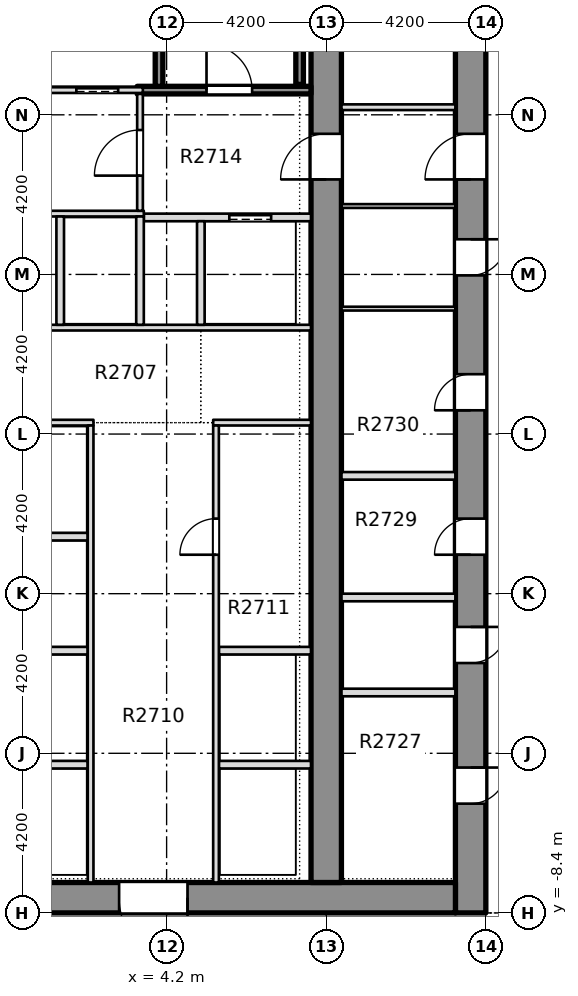
"""IFC4 building model, lengths in metres.
Left out: names, types, materials, properties, quantities, classifications, styles, units other than length and angle.
Written with IfcOpenShell. Run it as: python <this file> out.ifc"""

import sys

from ifc_helpers import new_model, si_unit, direction, frame, frame_2d, origin, place, context, subcontext, project, spatial, rectangle, extrude, element, fill, save


model = new_model("IFC4")
c1 = context("Model", 3, precision=1e-05, world=origin(), true_north=direction((0.0, 1.0)))
c2 = subcontext(c1, "Body", "Model", "MODEL_VIEW")
j1 = project(units=[si_unit("LENGTHUNIT", "METRE"), si_unit("PLANEANGLEUNIT", "RADIAN")], contexts=[c1])
p1 = place(None, origin())
s1 = spatial("IfcSite", under=j1, at=p1, CompositionType="ELEMENT")
p2 = place(p1, origin())
s2 = spatial("IfcBuilding", under=s1, at=p2, CompositionType="ELEMENT")
p3 = place(p2, frame((0.0, 0.0, 108.0)))
s3 = spatial("IfcBuildingStorey", under=s2, at=p3, CompositionType="ELEMENT", Elevation=108.0)
p4 = place(p3, frame((12.2, -8.4, -0.32), z_axis=(0.0, 0.0, 1.0), x_axis=(0.0, 1.0, 0.0)))
e1 = element("IfcWall", 1, at=p4, inside=s3, PredefinedType="SHEAR", context=c2, shape_type="SweptSolid", body=[
    extrude(rectangle(XDim=30.15, YDim=0.8, at=frame_2d((15.075, 0.0))), origin(), (0.0, 0.0, 1.0), 3.45),
])
p5 = place(p4, frame((2.875, 0.0, 0.32)))
e2 = element("IfcOpeningElement", 2, at=p5, cuts=e1, PredefinedType="OPENING", context=c2, shape_type="SweptSolid", body=[
    extrude(rectangle(XDim=0.95, YDim=2.1, at=frame_2d((0.475, 1.05))), frame((0.0, 0.41, 0.0), z_axis=(0.0, -1.0, 0.0), x_axis=(1.0, 0.0, 0.0)), (0.0, 0.0, 1.0), 0.82),
])
p6 = place(p4, frame((6.575, 0.0, 0.32)))
e3 = element("IfcOpeningElement", 3, at=p6, cuts=e1, PredefinedType="OPENING", context=c2, shape_type="SweptSolid", body=[
    extrude(rectangle(XDim=0.95, YDim=2.1, at=frame_2d((0.475, 1.05))), frame((0.0, 0.41, 0.0), z_axis=(0.0, -1.0, 0.0), x_axis=(1.0, 0.0, 0.0)), (0.0, 0.0, 1.0), 0.82),
])
p7 = place(p4, frame((9.425, 0.0, 0.32)))
e4 = element("IfcOpeningElement", 4, at=p7, cuts=e1, PredefinedType="OPENING", context=c2, shape_type="SweptSolid", body=[
    extrude(rectangle(XDim=0.95, YDim=2.1, at=frame_2d((0.475, 1.05))), frame((0.0, 0.41, 0.0), z_axis=(0.0, -1.0, 0.0), x_axis=(1.0, 0.0, 0.0)), (0.0, 0.0, 1.0), 0.82),
])
p8 = place(p4, frame((13.225, 0.0, 0.32)))
e5 = element("IfcOpeningElement", 5, at=p8, cuts=e1, PredefinedType="OPENING", context=c2, shape_type="SweptSolid", body=[
    extrude(rectangle(XDim=0.95, YDim=2.1, at=frame_2d((0.475, 1.05))), frame((0.0, 0.41, 0.0), z_axis=(0.0, -1.0, 0.0), x_axis=(1.0, 0.0, 0.0)), (0.0, 0.0, 1.0), 0.82),
])
p9 = place(p4, frame((16.775, 0.0, 0.32)))
e6 = element("IfcOpeningElement", 6, at=p9, cuts=e1, PredefinedType="OPENING", context=c2, shape_type="SweptSolid", body=[
    extrude(rectangle(XDim=0.95, YDim=2.1, at=frame_2d((0.475, 1.05))), frame((0.0, 0.41, 0.0), z_axis=(0.0, -1.0, 0.0), x_axis=(1.0, 0.0, 0.0)), (0.0, 0.0, 1.0), 0.82),
])
p10 = place(p4, frame((24.75, 0.0, 0.32)))
e7 = element("IfcOpeningElement", 7, at=p10, cuts=e1, PredefinedType="OPENING", context=c2, shape_type="SweptSolid", body=[
    extrude(rectangle(XDim=0.95, YDim=2.1, at=frame_2d((0.475, 1.05))), frame((0.0, 0.41, 0.0), z_axis=(0.0, -1.0, 0.0), x_axis=(1.0, 0.0, 0.0)), (0.0, 0.0, 1.0), 0.82),
])
p11 = place(p4, frame((19.3, 0.0, 0.32)))
e8 = element("IfcOpeningElement", 8, at=p11, cuts=e1, PredefinedType="OPENING", context=c2, shape_type="SweptSolid", body=[
    extrude(rectangle(XDim=1.2, YDim=2.1, at=frame_2d((0.6, 1.05))), frame((0.0, 0.41, 0.0), z_axis=(0.0, -1.0, 0.0), x_axis=(1.0, 0.0, 0.0)), (0.0, 0.0, 1.0), 0.82),
])
p12 = place(p3, frame((-11.8, -8.0, -0.32), z_axis=(0.0, 0.0, 1.0), x_axis=(1.0, 0.0, 0.0)))
e9 = element("IfcWall", 9, at=p12, inside=s3, PredefinedType="SHEAR", context=c2, shape_type="SweptSolid", body=[
    extrude(rectangle(XDim=23.6, YDim=0.8, at=frame_2d((11.8, 0.0))), origin(), (0.0, 0.0, 1.0), 3.45),
])
p13 = place(p12, frame((7.05, 0.0, 0.32)))
e10 = element("IfcOpeningElement", 10, at=p13, cuts=e9, PredefinedType="OPENING", context=c2, shape_type="SweptSolid", body=[
    extrude(rectangle(XDim=1.8, YDim=2.1, at=frame_2d((0.9, 1.05))), frame((0.0, 0.41, 0.0), z_axis=(0.0, -1.0, 0.0), x_axis=(1.0, 0.0, 0.0)), (0.0, 0.0, 1.0), 0.82),
])
p14 = place(p12, frame((14.75, 0.0, 0.32)))
e11 = element("IfcOpeningElement", 11, at=p14, cuts=e9, PredefinedType="OPENING", context=c2, shape_type="SweptSolid", body=[
    extrude(rectangle(XDim=1.8, YDim=2.1, at=frame_2d((0.9, 1.05))), frame((0.0, 0.41, 0.0), z_axis=(0.0, -1.0, 0.0), x_axis=(1.0, 0.0, 0.0)), (0.0, 0.0, 1.0), 0.82),
])
p15 = place(p3, frame((8.4, -7.6, -0.32), z_axis=(0.0, 0.0, 1.0), x_axis=(0.0, 1.0, 0.0)))
e12 = element("IfcWall", 12, at=p15, inside=s3, PredefinedType="SHEAR", context=c2, shape_type="SweptSolid", body=[
    extrude(rectangle(XDim=28.55, YDim=0.8, at=frame_2d((14.275, 0.0))), origin(), (0.0, 0.0, 1.0), 3.45),
])
p16 = place(p15, frame((18.5, 0.0, 0.32)))
e13 = element("IfcOpeningElement", 13, at=p16, cuts=e12, PredefinedType="OPENING", context=c2, shape_type="SweptSolid", body=[
    extrude(rectangle(XDim=1.2, YDim=2.1, at=frame_2d((0.6, 1.05))), frame((0.0, 0.41, 0.0), z_axis=(0.0, -1.0, 0.0), x_axis=(1.0, 0.0, 0.0)), (0.0, 0.0, 1.0), 0.82),
])
p17 = place(p3, frame((-2.125, -4.5, 0.0), z_axis=(0.0, 0.0, 1.0), x_axis=(1.0, 0.0, 0.0)))
e14 = element("IfcWall", 14, at=p17, inside=s3, PredefinedType="PARTITIONING", context=c2, shape_type="SweptSolid", body=[
    extrude(rectangle(XDim=4.25, YDim=0.2, at=frame_2d((2.125, 0.0))), origin(), (0.0, 0.0, 1.0), 3.13),
])
p18 = place(p3, frame((5.575, -4.5, 0.0), z_axis=(0.0, 0.0, 1.0), x_axis=(1.0, 0.0, 0.0)))
e15 = element("IfcWall", 15, at=p18, inside=s3, PredefinedType="PARTITIONING", context=c2, shape_type="SweptSolid", body=[
    extrude(rectangle(XDim=2.424, YDim=0.2, at=frame_2d((1.212, 0.0))), origin(), (0.0, 0.0, 1.0), 3.13),
])
p19 = place(p3, frame((-2.125, -1.5, 0.0), z_axis=(0.0, 0.0, 1.0), x_axis=(1.0, 0.0, 0.0)))
e16 = element("IfcWall", 16, at=p19, inside=s3, PredefinedType="PARTITIONING", context=c2, shape_type="SweptSolid", body=[
    extrude(rectangle(XDim=4.25, YDim=0.2, at=frame_2d((2.125, 0.0))), origin(), (0.0, 0.0, 1.0), 3.13),
])
p20 = place(p3, frame((5.575, -1.5, 0.0), z_axis=(0.0, 0.0, 1.0), x_axis=(1.0, 0.0, 0.0)))
e17 = element("IfcWall", 17, at=p20, inside=s3, PredefinedType="PARTITIONING", context=c2, shape_type="SweptSolid", body=[
    extrude(rectangle(XDim=2.424, YDim=0.2, at=frame_2d((1.212, 0.0))), origin(), (0.0, 0.0, 1.0), 3.13),
])
p21 = place(p3, frame((-2.125, 1.5, 0.0), z_axis=(0.0, 0.0, 1.0), x_axis=(1.0, 0.0, 0.0)))
e18 = element("IfcWall", 18, at=p21, inside=s3, PredefinedType="PARTITIONING", context=c2, shape_type="SweptSolid", body=[
    extrude(rectangle(XDim=4.25, YDim=0.2, at=frame_2d((2.125, 0.0))), origin(), (0.0, 0.0, 1.0), 3.13),
])
p22 = place(p3, frame((-2.275, 4.5, 0.0), z_axis=(0.0, 0.0, 1.0), x_axis=(1.0, 0.0, 0.0)))
e19 = element("IfcWall", 19, at=p22, inside=s3, PredefinedType="PARTITIONING", context=c2, shape_type="SweptSolid", body=[
    extrude(rectangle(XDim=4.55, YDim=0.15, at=frame_2d((2.275, 0.0))), origin(), (0.0, 0.0, 1.0), 3.13),
])
p23 = place(p3, frame((5.425, 4.5, 0.0), z_axis=(0.0, 0.0, 1.0), x_axis=(1.0, 0.0, 0.0)))
e20 = element("IfcWall", 20, at=p23, inside=s3, PredefinedType="PARTITIONING", context=c2, shape_type="SweptSolid", body=[
    extrude(rectangle(XDim=2.574, YDim=0.15, at=frame_2d((1.287, 0.0))), origin(), (0.0, 0.0, 1.0), 3.13),
])
p24 = place(p3, frame((-7.999, 7.0, 0.0), z_axis=(0.0, 0.0, 1.0), x_axis=(1.0, 0.0, 0.0)))
e21 = element("IfcWall", 21, at=p24, inside=s3, PredefinedType="PARTITIONING", context=c2, shape_type="SweptSolid", body=[
    extrude(rectangle(XDim=15.998, YDim=0.15, at=frame_2d((7.999, 0.0))), origin(), (0.0, 0.0, 1.0), 3.13),
])
p25 = place(p24, frame((7.299, 0.0, 0.0)))
e22 = element("IfcOpeningElement", 22, at=p25, cuts=e21, PredefinedType="OPENING", context=c2, shape_type="SweptSolid", body=[
    extrude(rectangle(XDim=1.4, YDim=2.1, at=frame_2d((0.7, 1.05))), frame((0.0, 0.085, 0.0), z_axis=(0.0, -1.0, 0.0), x_axis=(1.0, 0.0, 0.0)), (0.0, 0.0, 1.0), 0.17),
])
p26 = place(p3, frame((3.6, 9.9, 0.0), z_axis=(0.0, 0.0, 1.0), x_axis=(1.0, 0.0, 0.0)))
e23 = element("IfcWall", 23, at=p26, inside=s3, PredefinedType="PARTITIONING", context=c2, shape_type="SweptSolid", body=[
    extrude(rectangle(XDim=4.399, YDim=0.2, at=frame_2d((2.199, 0.0))), origin(), (0.0, 0.0, 1.0), 3.13),
])
p27 = place(p26, frame((2.25, 0.0, 0.0)))
e24 = element("IfcOpeningElement", 24, at=p27, cuts=e23, PredefinedType="OPENING", context=c2, shape_type="SweptSolid", body=[
    extrude(rectangle(XDim=1.1, YDim=2.1, at=frame_2d((0.55, 1.05))), frame((0.0, 0.11, 0.0), z_axis=(0.0, -1.0, 0.0), x_axis=(1.0, 0.0, 0.0)), (0.0, 0.0, 1.0), 0.22),
])
p28 = place(p3, frame((-3.6, 10.0, 0.0), z_axis=(0.0, 0.0, 1.0), x_axis=(1.0, 0.0, 0.0)))
e25 = element("IfcWall", 25, at=p28, inside=s3, PredefinedType="PARTITIONING", context=c2, shape_type="SweptSolid", body=[
    extrude(rectangle(XDim=7.2, YDim=0.15, at=frame_2d((3.6, 0.0))), origin(), (0.0, 0.0, 1.0), 3.13),
])
p29 = place(p28, frame((2.9, 0.0, 0.0)))
e26 = element("IfcOpeningElement", 26, at=p29, cuts=e25, PredefinedType="OPENING", context=c2, shape_type="SweptSolid", body=[
    extrude(rectangle(XDim=1.4, YDim=2.1, at=frame_2d((0.7, 1.05))), frame((0.0, 0.085, 0.0), z_axis=(0.0, -1.0, 0.0), x_axis=(1.0, 0.0, 0.0)), (0.0, 0.0, 1.0), 0.17),
])
p30 = place(p3, frame((-3.575, 13.25, 0.0), z_axis=(0.0, 0.0, 1.0), x_axis=(1.0, 0.0, 0.0)))
e27 = element("IfcWall", 27, at=p30, inside=s3, PredefinedType="PARTITIONING", context=c2, shape_type="SweptSolid", body=[
    extrude(rectangle(XDim=7.15, YDim=0.15, at=frame_2d((3.575, 0.0))), origin(), (0.0, 0.0, 1.0), 3.13),
])
p31 = place(p30, frame((0.6, 0.0, 0.0)))
e28 = element("IfcOpeningElement", 28, at=p31, cuts=e27, PredefinedType="OPENING", context=c2, shape_type="SweptSolid", body=[
    extrude(rectangle(XDim=1.2, YDim=2.1, at=frame_2d((0.6, 1.05))), frame((0.0, 0.085, 0.0), z_axis=(0.0, -1.0, 0.0), x_axis=(1.0, 0.0, 0.0)), (0.0, 0.0, 1.0), 0.17),
])
p32 = place(p30, frame((5.4, 0.0, 0.0)))
e29 = element("IfcOpeningElement", 29, at=p32, cuts=e27, PredefinedType="OPENING", context=c2, shape_type="SweptSolid", body=[
    extrude(rectangle(XDim=1.1, YDim=2.1, at=frame_2d((0.55, 1.05))), frame((0.0, 0.085, 0.0), z_axis=(0.0, -1.0, 0.0), x_axis=(1.0, 0.0, 0.0)), (0.0, 0.0, 1.0), 0.17),
])
p33 = place(p30, frame((2.975, 0.0, 0.0)))
e30 = element("IfcOpeningElement", 30, at=p33, cuts=e27, PredefinedType="OPENING", context=c2, shape_type="SweptSolid", body=[
    extrude(rectangle(XDim=1.2, YDim=2.1, at=frame_2d((0.6, 1.05))), frame((0.0, 0.085, 0.0), z_axis=(0.0, -1.0, 0.0), x_axis=(1.0, 0.0, 0.0)), (0.0, 0.0, 1.0), 0.17),
])
p34 = place(p3, frame((3.425, 13.25, 0.0), z_axis=(0.0, 0.0, 1.0), x_axis=(1.0, 0.0, 0.0)))
e31 = element("IfcWall", 31, at=p34, inside=s3, PredefinedType="SOLIDWALL", context=c2, shape_type="SweptSolid", body=[
    extrude(rectangle(XDim=4.574, YDim=0.2, at=frame_2d((2.287, 0.0))), origin(), (0.0, 0.0, 1.0), 3.13),
])
p35 = place(p34, frame((1.825, 0.0, 0.0)))
e32 = element("IfcOpeningElement", 32, at=p35, cuts=e31, PredefinedType="OPENING", context=c2, shape_type="SweptSolid", body=[
    extrude(rectangle(XDim=1.2, YDim=2.1, at=frame_2d((0.6, 1.05))), frame((0.0, 0.11, 0.0), z_axis=(0.0, -1.0, 0.0), x_axis=(1.0, 0.0, 0.0)), (0.0, 0.0, 1.0), 0.22),
])
p36 = place(p3, frame((1.4, 7.075, 0.0), z_axis=(0.0, 0.0, 1.0), x_axis=(0.0, 1.0, 0.0)))
e33 = element("IfcWall", 33, at=p36, inside=s3, PredefinedType="PARTITIONING", context=c2, shape_type="SweptSolid", body=[
    extrude(rectangle(XDim=2.85, YDim=0.2, at=frame_2d((1.425, 0.0))), origin(), (0.0, 0.0, 1.0), 3.13),
])
p37 = place(p3, frame((2.2, -7.599, 0.0), z_axis=(0.0, 0.0, 1.0), x_axis=(0.0, 1.0, 0.0)))
e34 = element("IfcWall", 34, at=p37, inside=s3, PredefinedType="PARTITIONING", context=c2, shape_type="SweptSolid", body=[
    extrude(rectangle(XDim=12.024, YDim=0.15, at=frame_2d((6.012, 0.0))), origin(), (0.0, 0.0, 1.0), 3.13),
])
p38 = place(p3, frame((3.5, 7.075, 0.0), z_axis=(0.0, 0.0, 1.0), x_axis=(0.0, 1.0, 0.0)))
e35 = element("IfcWall", 35, at=p38, inside=s3, PredefinedType="PARTITIONING", context=c2, shape_type="SweptSolid", body=[
    extrude(rectangle(XDim=2.85, YDim=0.2, at=frame_2d((1.425, 0.0))), origin(), (0.0, 0.0, 1.0), 3.13),
])
p39 = place(p3, frame((3.5, 10.075, 0.0), z_axis=(0.0, 0.0, 1.0), x_axis=(0.0, 1.0, 0.0)))
e36 = element("IfcWall", 36, at=p39, inside=s3, PredefinedType="PARTITIONING", context=c2, shape_type="SweptSolid", body=[
    extrude(rectangle(XDim=3.075, YDim=0.15, at=frame_2d((1.538, 0.0))), origin(), (0.0, 0.0, 1.0), 3.13),
])
p40 = place(p39, frame((0.925, 0.0, 0.0)))
e37 = element("IfcOpeningElement", 37, at=p40, cuts=e36, PredefinedType="OPENING", context=c2, shape_type="SweptSolid", body=[
    extrude(rectangle(XDim=1.2, YDim=2.1, at=frame_2d((0.6, 1.05))), frame((0.0, 0.085, 0.0), z_axis=(0.0, -1.0, 0.0), x_axis=(1.0, 0.0, 0.0)), (0.0, 0.0, 1.0), 0.17),
])
p41 = place(p3, frame((4.0, 13.35, 0.0), z_axis=(0.0, 0.0, 1.0), x_axis=(0.0, 1.0, 0.0)))
e38 = element("IfcWall", 38, at=p41, inside=s3, PredefinedType="SOLIDWALL", context=c2, shape_type="SweptSolid", body=[
    extrude(rectangle(XDim=2.6, YDim=0.2, at=frame_2d((1.3, 0.0))), origin(), (0.0, 0.0, 1.0), 3.13),
])
p42 = place(p3, frame((5.1, 7.075, 0.0), z_axis=(0.0, 0.0, 1.0), x_axis=(0.0, 1.0, 0.0)))
e39 = element("IfcWall", 39, at=p42, inside=s3, PredefinedType="PARTITIONING", context=c2, shape_type="SweptSolid", body=[
    extrude(rectangle(XDim=2.725, YDim=0.2, at=frame_2d((1.363, 0.0))), origin(), (0.0, 0.0, 1.0), 3.13),
])
p43 = place(p3, frame((5.5, -7.599, 0.0), z_axis=(0.0, 0.0, 1.0), x_axis=(0.0, 1.0, 0.0)))
e40 = element("IfcWall", 40, at=p43, inside=s3, PredefinedType="PARTITIONING", context=c2, shape_type="SweptSolid", body=[
    extrude(rectangle(XDim=12.024, YDim=0.15, at=frame_2d((6.012, 0.0))), origin(), (0.0, 0.0, 1.0), 3.13),
])
p44 = place(p43, frame((8.624, 0.0, 0.0)))
e41 = element("IfcOpeningElement", 41, at=p44, cuts=e40, PredefinedType="OPENING", context=c2, shape_type="SweptSolid", body=[
    extrude(rectangle(XDim=0.95, YDim=2.1, at=frame_2d((0.475, 1.05))), frame((0.0, 0.085, 0.0), z_axis=(0.0, -1.0, 0.0), x_axis=(1.0, 0.0, 0.0)), (0.0, 0.0, 1.0), 0.17),
])
for number, where, z_axis, x_axis in (
    (42, (8.801, -2.6, 0.0), (0.0, 0.0, 1.0), (1.0, 0.0, 0.0)),
    (43, (8.801, -0.1, 0.0), (0.0, 0.0, 1.0), (1.0, 0.0, 0.0)),
    (44, (8.801, 3.1, 0.0), (0.0, 0.0, 1.0), (1.0, 0.0, 0.0)),
):
    element("IfcWall", number, at=place(p3, frame(where, z_axis=z_axis, x_axis=x_axis)), inside=s3, PredefinedType="PARTITIONING", context=c2, shape_type="SweptSolid", body=[
        extrude(rectangle(XDim=2.998, YDim=0.2, at=frame_2d((1.499, 0.0))), origin(), (0.0, 0.0, 1.0), 3.13),
    ])
for number, where, z_axis, x_axis in (
    (45, (8.801, 7.5, 0.0), (0.0, 0.0, 1.0), (1.0, 0.0, 0.0)),
    (46, (8.801, 10.2, 0.0), (0.0, 0.0, 1.0), (1.0, 0.0, 0.0)),
):
    element("IfcWall", number, at=place(p3, frame(where, z_axis=z_axis, x_axis=x_axis)), inside=s3, PredefinedType="PARTITIONING", context=c2, shape_type="SweptSolid", body=[
        extrude(rectangle(XDim=2.998, YDim=0.1, at=frame_2d((1.499, 0.0))), origin(), (0.0, 0.0, 1.0), 3.13),
    ])
p45 = place(p3, frame((8.801, 12.8, 0.0), z_axis=(0.0, 0.0, 1.0), x_axis=(1.0, 0.0, 0.0)))
e47 = element("IfcWall", 47, at=p45, inside=s3, PredefinedType="PARTITIONING", context=c2, shape_type="SweptSolid", body=[
    extrude(rectangle(XDim=2.998, YDim=0.15, at=frame_2d((1.499, 0.0))), origin(), (0.0, 0.0, 1.0), 3.13),
])
p46 = place(p3, frame((7.7, 13.4, 0.0), z_axis=(0.0, 0.0, 1.0), x_axis=(0.0, 1.0, 0.0)))
e48 = element("IfcWall", 48, at=p46, inside=s3, PredefinedType="SOLIDWALL", context=c2, shape_type="SweptSolid", body=[
    extrude(rectangle(XDim=7.45, YDim=0.2, at=frame_2d((3.725, 0.0))), origin(), (0.0, 0.0, 1.0), 3.13),
])
p47 = place(p44, origin())
e49 = element("IfcDoor", 49, at=p47, inside=s3, OperationType="SINGLE_SWING_LEFT", PredefinedType="DOOR", context=c2, shape_type="SweptSolid", body=[
    extrude(rectangle(XDim=0.95, YDim=2.1, at=frame_2d((0.475, 1.05))), frame((0.0, 0.025, 0.0), z_axis=(0.0, -1.0, 0.0), x_axis=(1.0, 0.0, 0.0)), (0.0, 0.0, 1.0), 0.05),
])
fill(e41, e49)
p48 = place(p35, origin())
e50 = element("IfcDoor", 50, at=p48, inside=s3, OperationType="SINGLE_SWING_RIGHT", PredefinedType="DOOR", context=c2, shape_type="SweptSolid", body=[
    extrude(rectangle(XDim=1.2, YDim=2.1, at=frame_2d((0.6, 1.05))), frame((0.0, 0.025, 0.0), z_axis=(0.0, -1.0, 0.0), x_axis=(1.0, 0.0, 0.0)), (0.0, 0.0, 1.0), 0.05),
])
fill(e32, e50)
p49 = place(p27, origin())
e51 = element("IfcDoor", 51, at=p49, inside=s3, OperationType="SLIDING_TO_LEFT", PredefinedType="DOOR", context=c2, shape_type="SweptSolid", body=[
    extrude(rectangle(XDim=1.1, YDim=2.1, at=frame_2d((0.55, 1.05))), frame((0.0, 0.025, 0.0), z_axis=(0.0, -1.0, 0.0), x_axis=(1.0, 0.0, 0.0)), (0.0, 0.0, 1.0), 0.05),
])
fill(e24, e51)
p50 = place(p32, origin())
e52 = element("IfcDoor", 52, at=p50, inside=s3, OperationType="SLIDING_TO_LEFT", PredefinedType="DOOR", context=c2, shape_type="SweptSolid", body=[
    extrude(rectangle(XDim=1.1, YDim=2.1, at=frame_2d((0.55, 1.05))), frame((0.0, 0.025, 0.0), z_axis=(0.0, -1.0, 0.0), x_axis=(1.0, 0.0, 0.0)), (0.0, 0.0, 1.0), 0.05),
])
fill(e29, e52)
p51 = place(p40, origin())
e53 = element("IfcDoor", 53, at=p51, inside=s3, OperationType="SINGLE_SWING_LEFT", PredefinedType="DOOR", context=c2, shape_type="SweptSolid", body=[
    extrude(rectangle(XDim=1.2, YDim=2.1, at=frame_2d((0.6, 1.05))), frame((0.0, 0.025, 0.0), z_axis=(0.0, -1.0, 0.0), x_axis=(1.0, 0.0, 0.0)), (0.0, 0.0, 1.0), 0.05),
])
fill(e37, e53)
p52 = place(p14, origin())
e54 = element("IfcDoor", 54, at=p52, inside=s3, OperationType="SINGLE_SWING_LEFT", PredefinedType="DOOR", context=c2, shape_type="SweptSolid", body=[
    extrude(rectangle(XDim=1.8, YDim=2.1, at=frame_2d((0.9, 1.05))), frame((0.0, 0.025, 0.0), z_axis=(0.0, -1.0, 0.0), x_axis=(1.0, 0.0, 0.0)), (0.0, 0.0, 1.0), 0.05),
])
fill(e11, e54)
p53 = place(p5, origin())
e55 = element("IfcDoor", 55, at=p53, inside=s3, OperationType="SINGLE_SWING_LEFT", PredefinedType="DOOR", context=c2, shape_type="SweptSolid", body=[
    extrude(rectangle(XDim=0.95, YDim=2.1, at=frame_2d((0.475, 1.05))), frame((0.0, 0.025, 0.0), z_axis=(0.0, -1.0, 0.0), x_axis=(1.0, 0.0, 0.0)), (0.0, 0.0, 1.0), 0.05),
])
fill(e2, e55)
p54 = place(p6, origin())
e56 = element("IfcDoor", 56, at=p54, inside=s3, OperationType="SINGLE_SWING_LEFT", PredefinedType="DOOR", context=c2, shape_type="SweptSolid", body=[
    extrude(rectangle(XDim=0.95, YDim=2.1, at=frame_2d((0.475, 1.05))), frame((0.0, 0.025, 0.0), z_axis=(0.0, -1.0, 0.0), x_axis=(1.0, 0.0, 0.0)), (0.0, 0.0, 1.0), 0.05),
])
fill(e3, e56)
p55 = place(p7, origin())
e57 = element("IfcDoor", 57, at=p55, inside=s3, OperationType="SINGLE_SWING_LEFT", PredefinedType="DOOR", context=c2, shape_type="SweptSolid", body=[
    extrude(rectangle(XDim=0.95, YDim=2.1, at=frame_2d((0.475, 1.05))), frame((0.0, 0.025, 0.0), z_axis=(0.0, -1.0, 0.0), x_axis=(1.0, 0.0, 0.0)), (0.0, 0.0, 1.0), 0.05),
])
fill(e4, e57)
p56 = place(p8, origin())
e58 = element("IfcDoor", 58, at=p56, inside=s3, OperationType="SINGLE_SWING_LEFT", PredefinedType="DOOR", context=c2, shape_type="SweptSolid", body=[
    extrude(rectangle(XDim=0.95, YDim=2.1, at=frame_2d((0.475, 1.05))), frame((0.0, 0.025, 0.0), z_axis=(0.0, -1.0, 0.0), x_axis=(1.0, 0.0, 0.0)), (0.0, 0.0, 1.0), 0.05),
])
fill(e5, e58)
p57 = place(p9, origin())
e59 = element("IfcDoor", 59, at=p57, inside=s3, OperationType="SINGLE_SWING_LEFT", PredefinedType="DOOR", context=c2, shape_type="SweptSolid", body=[
    extrude(rectangle(XDim=0.95, YDim=2.1, at=frame_2d((0.475, 1.05))), frame((0.0, 0.025, 0.0), z_axis=(0.0, -1.0, 0.0), x_axis=(1.0, 0.0, 0.0)), (0.0, 0.0, 1.0), 0.05),
])
fill(e6, e59)
p58 = place(p11, origin())
e60 = element("IfcDoor", 60, at=p58, inside=s3, OperationType="SINGLE_SWING_LEFT", PredefinedType="DOOR", context=c2, shape_type="SweptSolid", body=[
    extrude(rectangle(XDim=1.2, YDim=2.1, at=frame_2d((0.6, 1.05))), frame((0.0, 0.025, 0.0), z_axis=(0.0, -1.0, 0.0), x_axis=(1.0, 0.0, 0.0)), (0.0, 0.0, 1.0), 0.05),
])
fill(e8, e60)
p59 = place(p16, origin())
e61 = element("IfcDoor", 61, at=p59, inside=s3, OperationType="SINGLE_SWING_LEFT", PredefinedType="DOOR", context=c2, shape_type="SweptSolid", body=[
    extrude(rectangle(XDim=1.2, YDim=2.1, at=frame_2d((0.6, 1.05))), frame((0.0, 0.025, 0.0), z_axis=(0.0, -1.0, 0.0), x_axis=(1.0, 0.0, 0.0)), (0.0, 0.0, 1.0), 0.05),
])
fill(e13, e61)
save(model, sys.argv[1])
